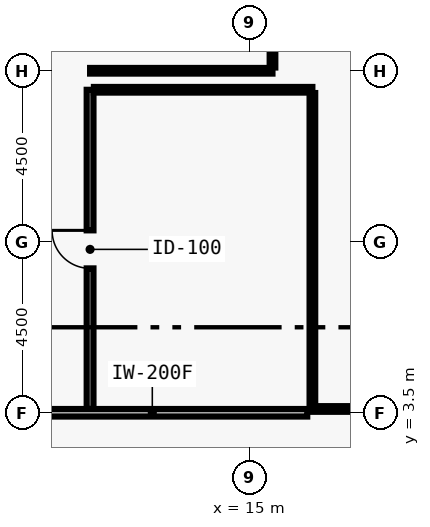
"""IFC4 building model, lengths in metres.
Left out: names, types, materials, properties, quantities, classifications, styles, units other than length and angle.
Written with IfcOpenShell. Run it as: python <this file> out.ifc"""

import sys

from ifc_helpers import new_model, si_unit, direction, frame, frame_2d, origin, place, context, subcontext, project, spatial, rectangle, extrude, element, fill, save


model = new_model("IFC4")
c1 = context("Model", 3, precision=1e-05, world=origin(), true_north=direction((0.0, 1.0)))
c2 = subcontext(c1, "Body", "Model", "MODEL_VIEW")
j1 = project(units=[si_unit("LENGTHUNIT", "METRE"), si_unit("PLANEANGLEUNIT", "RADIAN")], contexts=[c1])
p1 = place(None, origin())
s1 = spatial("IfcSite", under=j1, at=p1, CompositionType="ELEMENT")
p2 = place(p1, origin())
s2 = spatial("IfcBuilding", under=s1, at=p2, CompositionType="ELEMENT")
p3 = place(p2, origin())
s3 = spatial("IfcBuildingStorey", under=s2, at=p3, CompositionType="ELEMENT", Elevation=0.0)
p4 = place(p3, frame((10.8, 3.6, 0.0), z_axis=(0.0, 0.0, 1.0), x_axis=(0.0, 1.0, 0.0)))
e1 = element("IfcWall", 1, at=p4, inside=s3, PredefinedType="PLUMBINGWALL", context=c2, shape_type="SweptSolid", body=[
    extrude(rectangle(XDim=8.4, YDim=0.18, at=frame_2d((4.2, 0.0))), origin(), (0.0, 0.0, 1.0), 4.28),
])
p5 = place(p4, frame((3.7, 0.0, 0.0)))
e2 = element("IfcOpeningElement", 2, at=p5, cuts=e1, PredefinedType="OPENING", context=c2, shape_type="SweptSolid", body=[
    extrude(rectangle(XDim=1.0, YDim=2.1, at=frame_2d((0.5, 1.05))), frame((0.0, 0.1, 0.0), z_axis=(0.0, -1.0, 0.0), x_axis=(1.0, 0.0, 0.0)), (0.0, 0.0, 1.0), 0.2),
])
p6 = place(p3, frame((33.05, 3.6, 0.0), z_axis=(0.0, 0.0, 1.0), x_axis=(-1.0, 0.0, 0.0)))
e3 = element("IfcWall", 3, at=p6, inside=s3, PredefinedType="PARTITIONING", context=c2, shape_type="SweptSolid", body=[
    extrude(rectangle(XDim=16.4, YDim=0.15, at=frame_2d((8.2, 0.0))), origin(), (0.0, 0.0, 1.0), 4.28),
])
p7 = place(p6, frame((7.7, 0.0, 0.0)))
e4 = element("IfcOpeningElement", 4, at=p7, cuts=e3, PredefinedType="OPENING", context=c2, shape_type="SweptSolid", body=[
    extrude(rectangle(XDim=1.0, YDim=2.1, at=frame_2d((0.5, 1.05))), frame((0.0, 0.085, 0.0), z_axis=(0.0, -1.0, 0.0), x_axis=(1.0, 0.0, 0.0)), (0.0, 0.0, 1.0), 0.17),
])
p8 = place(p3, frame((16.515, 3.5, 0.0), z_axis=(0.0, 0.0, 1.0), x_axis=(-1.0, 0.0, 0.0)))
e5 = element("IfcWall", 5, at=p8, inside=s3, PredefinedType="MOVABLE", context=c2, shape_type="SweptSolid", body=[
    extrude(rectangle(XDim=8.155, YDim=0.2, at=frame_2d((4.077, 0.0))), origin(), (0.0, 0.0, 1.0), 4.28),
])
p9 = place(p3, frame((10.8, 12.5, 0.0), z_axis=(0.0, 0.0, 1.0), x_axis=(1.0, 0.0, 0.0)))
e6 = element("IfcWall", 6, at=p9, inside=s3, PredefinedType="PARTITIONING", context=c2, shape_type="SweptSolid", body=[
    extrude(rectangle(XDim=4.8, YDim=0.15, at=frame_2d((2.4, 0.0))), origin(), (0.0, 0.0, 1.0), 3.362),
])
p10 = place(p3, frame((15.6, 12.585, 0.0), z_axis=(0.0, 0.0, 1.0), x_axis=(0.0, 1.0, 0.0)))
e7 = element("IfcWall", 7, at=p10, inside=s3, PredefinedType="PARTITIONING", context=c2, shape_type="SweptSolid", body=[
    extrude(rectangle(XDim=2.33, YDim=0.15, at=frame_2d((1.165, 0.0))), origin(), (0.0, 0.0, 1.0), 3.562),
])
p11 = place(p3, frame((10.9, 12.0, 0.0), z_axis=(0.0, 0.0, 1.0), x_axis=(1.0, 0.0, 0.0)))
e8 = element("IfcWall", 8, at=p11, inside=s3, PredefinedType="PARTITIONING", context=c2, shape_type="SweptSolid", body=[
    extrude(rectangle(XDim=5.75, YDim=0.15, at=frame_2d((2.875, 0.0))), origin(), (0.0, 0.0, 1.0), 4.28),
])
p12 = place(p3, frame((16.65, 11.915, 0.0), z_axis=(0.0, 0.0, 1.0), x_axis=(0.0, -1.0, 0.0)))
e9 = element("IfcWall", 9, at=p12, inside=s3, PredefinedType="PARTITIONING", context=c2, shape_type="SweptSolid", body=[
    extrude(rectangle(XDim=8.23, YDim=0.15, at=frame_2d((4.115, 0.0))), origin(), (0.0, 0.0, 1.0), 4.28),
])
p13 = place(p5, origin())
e10 = element("IfcDoor", 10, at=p13, inside=s3, OperationType="SINGLE_SWING_RIGHT", PredefinedType="DOOR", context=c2, shape_type="SweptSolid", body=[
    extrude(rectangle(XDim=1.0, YDim=2.1, at=frame_2d((0.5, 1.05))), frame((0.0, 0.025, 0.0), z_axis=(0.0, -1.0, 0.0), x_axis=(1.0, 0.0, 0.0)), (0.0, 0.0, 1.0), 0.05),
])
fill(e2, e10)
save(model, sys.argv[1])
